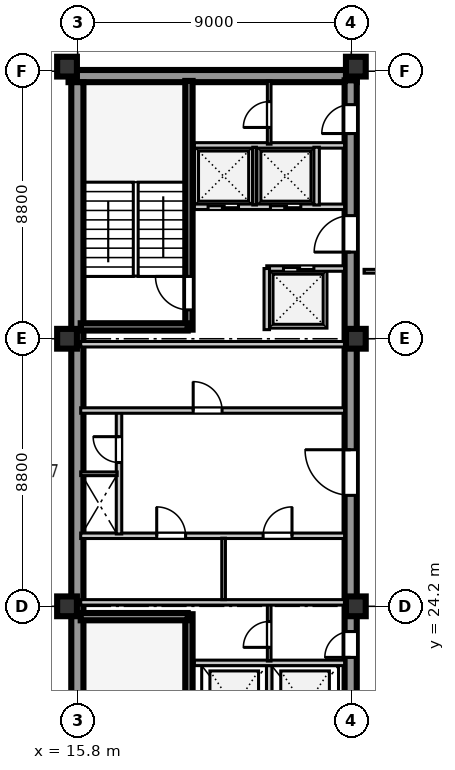
"""IFC4 building model, lengths in metres.
Left out: names, types, materials, properties, quantities, classifications, styles, units other than length and angle.
Written with IfcOpenShell. Run it as: python <this file> out.ifc"""

import sys

from ifc_helpers import new_model, si_unit, direction, frame, frame_2d, origin, origin_2d, place, context, subcontext, project, spatial, rectangle, extrude, element, fill, save


model = new_model("IFC4")
c1 = context("Model", 3, precision=1e-05, world=origin(), true_north=direction((0.0, 1.0)))
c2 = subcontext(c1, "Body", "Model", "MODEL_VIEW")
j1 = project(units=[si_unit("LENGTHUNIT", "METRE"), si_unit("PLANEANGLEUNIT", "RADIAN")], contexts=[c1])
p1 = place(None, origin())
s1 = spatial("IfcSite", under=j1, at=p1, CompositionType="ELEMENT")
p2 = place(p1, origin())
s2 = spatial("IfcBuilding", under=s1, at=p2, CompositionType="ELEMENT")
p3 = place(p2, frame((0.0, 0.0, 272.6)))
s3 = spatial("IfcBuildingStorey", under=s2, at=p3, CompositionType="ELEMENT", Elevation=272.6)
p4 = place(p3, frame((15.5, 41.64, 0.0), z_axis=(0.0, 0.0, 1.0), x_axis=(1.0, 0.0, 0.0)))
e1 = element("IfcWall", 1, at=p4, inside=s3, PredefinedType="SHEAR", context=c2, shape_type="SweptSolid", body=[
    extrude(rectangle(XDim=9.48, YDim=0.4, at=frame_2d((4.74, 0.0))), origin(), (0.0, 0.0, 1.0), 3.66),
])
p5 = place(p3, frame((15.79, 15.81, 0.0), z_axis=(0.0, 0.0, 1.0), x_axis=(0.0, 1.0, 0.0)))
e2 = element("IfcWall", 2, at=p5, inside=s3, PredefinedType="SHEAR", context=c2, shape_type="SweptSolid", body=[
    extrude(rectangle(XDim=25.63, YDim=0.4, at=frame_2d((12.815, 0.0))), origin(), (0.0, 0.0, 1.0), 3.66),
])
p6 = place(p3, frame((24.78, 15.74, 0.0), z_axis=(0.0, 0.0, 1.0), x_axis=(0.0, 1.0, 0.0)))
e3 = element("IfcWall", 3, at=p6, inside=s3, PredefinedType="SHEAR", context=c2, shape_type="SweptSolid", body=[
    extrude(rectangle(XDim=25.76, YDim=0.4, at=frame_2d((12.88, 0.0))), origin(), (0.0, 0.0, 1.0), 3.66),
])
p7 = place(p6, frame((1.61, 0.0, 0.0)))
e4 = element("IfcOpeningElement", 4, at=p7, cuts=e3, PredefinedType="OPENING", context=c2, shape_type="SweptSolid", body=[
    extrude(rectangle(XDim=1.2, YDim=2.1, at=frame_2d((0.6, 1.05))), frame((0.0, 0.21, 0.0), z_axis=(0.0, -1.0, 0.0), x_axis=(1.0, 0.0, 0.0)), (0.0, 0.0, 1.0), 0.42),
])
p8 = place(p6, frame((6.78, 0.0, 0.0)))
e5 = element("IfcOpeningElement", 5, at=p8, cuts=e3, PredefinedType="OPENING", context=c2, shape_type="SweptSolid", body=[
    extrude(rectangle(XDim=0.85, YDim=2.06, at=frame_2d((0.425, 1.03))), frame((0.0, 0.21, 0.0), z_axis=(0.0, -1.0, 0.0), x_axis=(1.0, 0.0, 0.0)), (0.0, 0.0, 1.0), 0.42),
])
p9 = place(p6, frame((12.11, 0.0, 0.0)))
e6 = element("IfcOpeningElement", 6, at=p9, cuts=e3, PredefinedType="OPENING", context=c2, shape_type="SweptSolid", body=[
    extrude(rectangle(XDim=1.5, YDim=2.12, at=frame_2d((0.75, 1.06))), frame((0.0, 0.21, 0.0), z_axis=(0.0, -1.0, 0.0), x_axis=(1.0, 0.0, 0.0)), (0.0, 0.0, 1.0), 0.42),
])
p10 = place(p6, frame((20.11, 0.0, 0.0)))
e7 = element("IfcOpeningElement", 7, at=p10, cuts=e3, PredefinedType="OPENING", context=c2, shape_type="SweptSolid", body=[
    extrude(rectangle(XDim=1.2, YDim=2.12, at=frame_2d((0.6, 1.06))), frame((0.0, 0.21, 0.0), z_axis=(0.0, -1.0, 0.0), x_axis=(1.0, 0.0, 0.0)), (0.0, 0.0, 1.0), 0.42),
])
p11 = place(p6, frame((24.01, 0.0, 0.0)))
e8 = element("IfcOpeningElement", 8, at=p11, cuts=e3, PredefinedType="OPENING", context=c2, shape_type="SweptSolid", body=[
    extrude(rectangle(XDim=0.95, YDim=2.1, at=frame_2d((0.475, 1.05))), frame((0.0, 0.21, 0.0), z_axis=(0.0, -1.0, 0.0), x_axis=(1.0, 0.0, 0.0)), (0.0, 0.0, 1.0), 0.42),
])
for number, where, z_axis, x_axis in (
    (9, (15.45, 24.2, 0.0), (0.0, 0.0, 1.0), (1.0, 0.0, 0.0)),
    (10, (15.45, 33.0, 0.0), (0.0, 0.0, 1.0), (1.0, 0.0, 0.0)),
    (11, (15.45, 41.95, 0.0), (0.0, 0.0, 1.0), (1.0, 0.0, 0.0)),
    (12, (24.95, 24.2, 0.0), (0.0, 0.0, 1.0), (1.0, 0.0, 0.0)),
    (13, (24.95, 33.0, 0.0), (0.0, 0.0, 1.0), (1.0, 0.0, 0.0)),
    (14, (24.95, 41.95, 0.0), (0.0, 0.0, 1.0), (1.0, 0.0, 0.0)),
):
    element("IfcColumn", number, at=place(p3, frame(where, z_axis=z_axis, x_axis=x_axis)), inside=s3, PredefinedType="COLUMN", context=c2, shape_type="SweptSolid", body=[
        extrude(rectangle(XDim=0.65, YDim=0.65, at=origin_2d()), origin(), (0.0, 0.0, 1.0), 3.66),
    ])
p12 = place(p3, frame((19.46, 15.74, 0.0), z_axis=(0.0, 0.0, 1.0), x_axis=(0.0, 1.0, 0.0)))
e15 = element("IfcWall", 15, at=p12, inside=s3, PredefinedType="SHEAR", context=c2, shape_type="SweptSolid", body=[
    extrude(rectangle(XDim=8.2, YDim=0.24, at=frame_2d((4.1, 0.0))), origin(), (0.0, 0.0, 1.0), 3.9),
])
p13 = place(p12, frame((0.45, 0.0, 0.0)))
e16 = element("IfcOpeningElement", 16, at=p13, cuts=e15, PredefinedType="OPENING", context=c2, shape_type="SweptSolid", body=[
    extrude(rectangle(XDim=1.1, YDim=2.1, at=frame_2d((0.55, 1.05))), frame((0.0, 0.13, 0.0), z_axis=(0.0, -1.0, 0.0), x_axis=(1.0, 0.0, 0.0)), (0.0, 0.0, 1.0), 0.26),
])
p14 = place(p3, frame((15.9, 23.86, 0.0), z_axis=(0.0, 0.0, 1.0), x_axis=(1.0, 0.0, 0.0)))
e17 = element("IfcWall", 17, at=p14, inside=s3, PredefinedType="SHEAR", context=c2, shape_type="SweptSolid", body=[
    extrude(rectangle(XDim=3.52, YDim=0.24, at=frame_2d((1.76, 0.0))), origin(), (0.0, 0.0, 1.0), 3.9),
])
p15 = place(p3, frame((22.1, 19.51, 0.0), z_axis=(0.0, 0.0, 1.0), x_axis=(0.0, 1.0, 0.0)))
e18 = element("IfcWall", 18, at=p15, inside=s3, PredefinedType="SOLIDWALL", context=c2, shape_type="SweptSolid", body=[
    extrude(rectangle(XDim=2.74, YDim=0.18, at=frame_2d((1.37, 0.0))), origin(), (0.0, 0.0, 1.0), 3.66),
])
p16 = place(p3, frame((19.64, 22.34, 0.0), z_axis=(0.0, 0.0, 1.0), x_axis=(1.0, 0.0, 0.0)))
e19 = element("IfcWall", 19, at=p16, inside=s3, PredefinedType="SOLIDWALL", context=c2, shape_type="SweptSolid", body=[
    extrude(rectangle(XDim=4.94, YDim=0.18, at=frame_2d((2.47, 0.0))), origin(), (0.0, 0.0, 1.0), 3.66),
])
p17 = place(p3, frame((22.1, 22.4, 0.0), z_axis=(0.0, 0.0, 1.0), x_axis=(0.0, 1.0, 0.0)))
e20 = element("IfcWall", 20, at=p17, inside=s3, PredefinedType="PARTITIONING", context=c2, shape_type="SweptSolid", body=[
    extrude(rectangle(XDim=1.88, YDim=0.12, at=frame_2d((0.94, 0.0))), origin(), (0.0, 0.0, 1.0), 3.66),
])
p18 = place(p17, frame((0.45, 0.0, 0.0)))
e21 = element("IfcOpeningElement", 21, at=p18, cuts=e20, PredefinedType="OPENING", context=c2, shape_type="SweptSolid", body=[
    extrude(rectangle(XDim=0.85, YDim=2.06, at=frame_2d((0.425, 1.03))), frame((0.0, 0.07, 0.0), z_axis=(0.0, -1.0, 0.0), x_axis=(1.0, 0.0, 0.0)), (0.0, 0.0, 1.0), 0.14),
])
p19 = place(p3, frame((15.9, 26.52, 0.0), z_axis=(0.0, 0.0, 1.0), x_axis=(1.0, 0.0, 0.0)))
e22 = element("IfcWall", 22, at=p19, inside=s3, PredefinedType="SOLIDWALL", context=c2, shape_type="SweptSolid", body=[
    extrude(rectangle(XDim=8.68, YDim=0.18, at=frame_2d((4.34, 0.0))), origin(), (0.0, 0.0, 1.0), 3.66),
])
p20 = place(p19, frame((2.5, 0.0, 0.0)))
e23 = element("IfcOpeningElement", 23, at=p20, cuts=e22, PredefinedType="OPENING", context=c2, shape_type="SweptSolid", body=[
    extrude(rectangle(XDim=0.95, YDim=2.1, at=frame_2d((0.475, 1.05))), frame((0.0, 0.1, 0.0), z_axis=(0.0, -1.0, 0.0), x_axis=(1.0, 0.0, 0.0)), (0.0, 0.0, 1.0), 0.2),
])
p21 = place(p19, frame((6.0, 0.0, 0.0)))
e24 = element("IfcOpeningElement", 24, at=p21, cuts=e22, PredefinedType="OPENING", context=c2, shape_type="SweptSolid", body=[
    extrude(rectangle(XDim=0.95, YDim=2.1, at=frame_2d((0.475, 1.05))), frame((0.0, 0.1, 0.0), z_axis=(0.0, -1.0, 0.0), x_axis=(1.0, 0.0, 0.0)), (0.0, 0.0, 1.0), 0.2),
])
p22 = place(p3, frame((15.9, 24.33, 0.0), z_axis=(0.0, 0.0, 1.0), x_axis=(1.0, 0.0, 0.0)))
e25 = element("IfcWall", 25, at=p22, inside=s3, PredefinedType="SOLIDWALL", context=c2, shape_type="SweptSolid", body=[
    extrude(rectangle(XDim=8.68, YDim=0.18, at=frame_2d((4.34, 0.0))), origin(), (0.0, 0.0, 1.0), 3.06),
])
p23 = place(p3, frame((20.6, 24.42, 0.0), z_axis=(0.0, 0.0, 1.0), x_axis=(0.0, 1.0, 0.0)))
e26 = element("IfcWall", 26, at=p23, inside=s3, PredefinedType="PARTITIONING", context=c2, shape_type="SweptSolid", body=[
    extrude(rectangle(XDim=2.02, YDim=0.12, at=frame_2d((1.01, 0.0))), origin(), (0.0, 0.0, 1.0), 3.66),
])
p24 = place(p3, frame((17.16, 26.58, 0.0), z_axis=(0.0, 0.0, 1.0), x_axis=(0.0, 1.0, 0.0)))
e27 = element("IfcWall", 27, at=p24, inside=s3, PredefinedType="SOLIDWALL", context=c2, shape_type="SweptSolid", body=[
    extrude(rectangle(XDim=4.02, YDim=0.18, at=frame_2d((2.01, 0.0))), origin(), (0.0, 0.0, 1.0), 3.66),
])
p25 = place(p24, frame((2.35, 0.0, 0.0)))
e28 = element("IfcOpeningElement", 28, at=p25, cuts=e27, PredefinedType="OPENING", context=c2, shape_type="SweptSolid", body=[
    extrude(rectangle(XDim=0.85, YDim=2.06, at=frame_2d((0.425, 1.03))), frame((0.0, 0.1, 0.0), z_axis=(0.0, -1.0, 0.0), x_axis=(1.0, 0.0, 0.0)), (0.0, 0.0, 1.0), 0.2),
])
p26 = place(p3, frame((15.9, 28.56, 0.0), z_axis=(0.0, 0.0, 1.0), x_axis=(1.0, 0.0, 0.0)))
e29 = element("IfcWall", 29, at=p26, inside=s3, PredefinedType="PARTITIONING", context=c2, shape_type="SweptSolid", body=[
    extrude(rectangle(XDim=1.2, YDim=0.12, at=frame_2d((0.6, 0.0))), origin(), (0.0, 0.0, 1.0), 3.66),
])
p27 = place(p3, frame((15.9, 30.64, 0.0), z_axis=(0.0, 0.0, 1.0), x_axis=(1.0, 0.0, 0.0)))
e30 = element("IfcWall", 30, at=p27, inside=s3, PredefinedType="SOLIDWALL", context=c2, shape_type="SweptSolid", body=[
    extrude(rectangle(XDim=8.68, YDim=0.18, at=frame_2d((4.34, 0.0))), origin(), (0.0, 0.0, 1.0), 3.66),
])
p28 = place(p27, frame((3.7, 0.0, 0.0)))
e31 = element("IfcOpeningElement", 31, at=p28, cuts=e30, PredefinedType="OPENING", context=c2, shape_type="SweptSolid", body=[
    extrude(rectangle(XDim=0.95, YDim=2.1, at=frame_2d((0.475, 1.05))), frame((0.0, 0.1, 0.0), z_axis=(0.0, -1.0, 0.0), x_axis=(1.0, 0.0, 0.0)), (0.0, 0.0, 1.0), 0.2),
])
p29 = place(p3, frame((15.9, 32.82, 0.0), z_axis=(0.0, 0.0, 1.0), x_axis=(1.0, 0.0, 0.0)))
e32 = element("IfcWall", 32, at=p29, inside=s3, PredefinedType="SOLIDWALL", context=c2, shape_type="SweptSolid", body=[
    extrude(rectangle(XDim=8.68, YDim=0.18, at=frame_2d((4.34, 0.0))), origin(), (0.0, 0.0, 1.0), 3.06),
])
p30 = place(p3, frame((19.46, 33.3, 0.0), z_axis=(0.0, 0.0, 1.0), x_axis=(0.0, 1.0, 0.0)))
e33 = element("IfcWall", 33, at=p30, inside=s3, PredefinedType="SHEAR", context=c2, shape_type="SweptSolid", body=[
    extrude(rectangle(XDim=8.18, YDim=0.24, at=frame_2d((4.09, 0.0))), origin(), (0.0, 0.0, 1.0), 3.9),
])
p31 = place(p30, frame((0.65, 0.0, 0.0)))
e34 = element("IfcOpeningElement", 34, at=p31, cuts=e33, PredefinedType="OPENING", context=c2, shape_type="SweptSolid", body=[
    extrude(rectangle(XDim=1.1, YDim=2.1, at=frame_2d((0.55, 1.05))), frame((0.0, 0.13, 0.0), z_axis=(0.0, -1.0, 0.0), x_axis=(1.0, 0.0, 0.0)), (0.0, 0.0, 1.0), 0.26),
])
p32 = place(p3, frame((15.9, 33.39, 0.0), z_axis=(0.0, 0.0, 1.0), x_axis=(1.0, 0.0, 0.0)))
e35 = element("IfcWall", 35, at=p32, inside=s3, PredefinedType="SHEAR", context=c2, shape_type="SweptSolid", body=[
    extrude(rectangle(XDim=3.52, YDim=0.24, at=frame_2d((1.76, 0.0))), origin(), (0.0, 0.0, 1.0), 3.9),
])
p33 = place(p3, frame((22.02, 35.31, 0.0), z_axis=(0.0, 0.0, 1.0), x_axis=(1.0, 0.0, 0.0)))
e36 = element("IfcWall", 36, at=p33, inside=s3, PredefinedType="SOLIDWALL", context=c2, shape_type="SweptSolid", body=[
    extrude(rectangle(XDim=2.56, YDim=0.18, at=frame_2d((1.28, 0.0))), origin(), (0.0, 0.0, 1.0), 3.66),
])
p34 = place(p33, frame((0.55, 0.0, 0.0)))
e37 = element("IfcOpeningElement", 37, at=p34, cuts=e36, PredefinedType="OPENING", context=c2, shape_type="SweptSolid", body=[
    extrude(rectangle(XDim=1.0, YDim=2.1, at=frame_2d((0.5, 1.05))), frame((0.0, 0.1, 0.0), z_axis=(0.0, -1.0, 0.0), x_axis=(1.0, 0.0, 0.0)), (0.0, 0.0, 1.0), 0.2),
])
p35 = place(p3, frame((22.02, 33.3, 0.0), z_axis=(0.0, 0.0, 1.0), x_axis=(0.0, 1.0, 0.0)))
e38 = element("IfcWall", 38, at=p35, inside=s3, PredefinedType="SOLIDWALL", context=c2, shape_type="SweptSolid", body=[
    extrude(rectangle(XDim=2.01, YDim=0.18, at=frame_2d((1.005, 0.0))), origin(), (0.0, 0.0, 1.0), 3.66),
])
p36 = place(p3, frame((19.64, 37.34, 0.0), z_axis=(0.0, 0.0, 1.0), x_axis=(1.0, 0.0, 0.0)))
e39 = element("IfcWall", 39, at=p36, inside=s3, PredefinedType="SOLIDWALL", context=c2, shape_type="SweptSolid", body=[
    extrude(rectangle(XDim=4.94, YDim=0.18, at=frame_2d((2.47, 0.0))), origin(), (0.0, 0.0, 1.0), 3.66),
])
p37 = place(p36, frame((0.45, 0.0, 0.0)))
e40 = element("IfcOpeningElement", 40, at=p37, cuts=e39, PredefinedType="OPENING", context=c2, shape_type="SweptSolid", body=[
    extrude(rectangle(XDim=1.0, YDim=2.1, at=frame_2d((0.5, 1.05))), frame((0.0, 0.1, 0.0), z_axis=(0.0, -1.0, 0.0), x_axis=(1.0, 0.0, 0.0)), (0.0, 0.0, 1.0), 0.2),
])
p38 = place(p36, frame((2.5, 0.0, 0.0)))
e41 = element("IfcOpeningElement", 41, at=p38, cuts=e39, PredefinedType="OPENING", context=c2, shape_type="SweptSolid", body=[
    extrude(rectangle(XDim=1.0, YDim=2.1, at=frame_2d((0.5, 1.05))), frame((0.0, 0.1, 0.0), z_axis=(0.0, -1.0, 0.0), x_axis=(1.0, 0.0, 0.0)), (0.0, 0.0, 1.0), 0.2),
])
p39 = place(p3, frame((19.64, 39.36, 0.0), z_axis=(0.0, 0.0, 1.0), x_axis=(1.0, 0.0, 0.0)))
e42 = element("IfcWall", 42, at=p39, inside=s3, PredefinedType="SOLIDWALL", context=c2, shape_type="SweptSolid", body=[
    extrude(rectangle(XDim=4.94, YDim=0.18, at=frame_2d((2.47, 0.0))), origin(), (0.0, 0.0, 1.0), 3.66),
])
p40 = place(p3, frame((21.62, 37.4, 0.0), z_axis=(0.0, 0.0, 1.0), x_axis=(0.0, 1.0, 0.0)))
e43 = element("IfcWall", 43, at=p40, inside=s3, PredefinedType="PARTITIONING", context=c2, shape_type="SweptSolid", body=[
    extrude(rectangle(XDim=1.9, YDim=0.12, at=frame_2d((0.95, 0.0))), origin(), (0.0, 0.0, 1.0), 3.66),
])
p41 = place(p3, frame((23.66, 37.4, 0.0), z_axis=(0.0, 0.0, 1.0), x_axis=(0.0, 1.0, 0.0)))
e44 = element("IfcWall", 44, at=p41, inside=s3, PredefinedType="SOLIDWALL", context=c2, shape_type="SweptSolid", body=[
    extrude(rectangle(XDim=1.9, YDim=0.18, at=frame_2d((0.95, 0.0))), origin(), (0.0, 0.0, 1.0), 3.66),
])
p42 = place(p3, frame((22.1, 39.4, 0.0), z_axis=(0.0, 0.0, 1.0), x_axis=(0.0, 1.0, 0.0)))
e45 = element("IfcWall", 45, at=p42, inside=s3, PredefinedType="PARTITIONING", context=c2, shape_type="SweptSolid", body=[
    extrude(rectangle(XDim=2.08, YDim=0.12, at=frame_2d((1.04, 0.0))), origin(), (0.0, 0.0, 1.0), 3.66),
])
p43 = place(p42, frame((0.55, 0.0, 0.0)))
e46 = element("IfcOpeningElement", 46, at=p43, cuts=e45, PredefinedType="OPENING", context=c2, shape_type="SweptSolid", body=[
    extrude(rectangle(XDim=0.85, YDim=2.06, at=frame_2d((0.425, 1.03))), frame((0.0, 0.07, 0.0), z_axis=(0.0, -1.0, 0.0), x_axis=(1.0, 0.0, 0.0)), (0.0, 0.0, 1.0), 0.14),
])
p44 = place(p3, frame((25.22, 35.22, 0.0), z_axis=(0.0, 0.0, 1.0), x_axis=(1.0, 0.0, 0.0)))
e47 = element("IfcWall", 47, at=p44, inside=s3, PredefinedType="PLUMBINGWALL", context=c2, shape_type="SweptSolid", body=[
    extrude(rectangle(XDim=9.5, YDim=0.125, at=frame_2d((4.75, 0.0))), origin(), (0.0, 0.0, 1.0), 3.66),
])
p45 = place(p44, frame((1.8, 0.0, 0.0)))
e48 = element("IfcOpeningElement", 48, at=p45, cuts=e47, PredefinedType="OPENING", context=c2, shape_type="SweptSolid", body=[
    extrude(rectangle(XDim=1.1, YDim=2.08, at=frame_2d((0.55, 1.04))), frame((0.0, 0.073, 0.0), z_axis=(0.0, -1.0, 0.0), x_axis=(1.0, 0.0, 0.0)), (0.0, 0.0, 1.0), 0.145),
])
p46 = place(p18, origin())
e49 = element("IfcDoor", 49, at=p46, inside=s3, OperationType="SINGLE_SWING_LEFT", PredefinedType="DOOR", context=c2, shape_type="SweptSolid", body=[
    extrude(rectangle(XDim=0.85, YDim=2.06, at=frame_2d((0.425, 1.03))), frame((0.0, 0.025, 0.0), z_axis=(0.0, -1.0, 0.0), x_axis=(1.0, 0.0, 0.0)), (0.0, 0.0, 1.0), 0.05),
])
fill(e21, e49)
p47 = place(p8, frame((0.85, 0.0, 0.0), z_axis=(0.0, 0.0, 1.0), x_axis=(-1.0, 0.0, 0.0)))
e50 = element("IfcDoor", 50, at=p47, inside=s3, OperationType="SINGLE_SWING_RIGHT", PredefinedType="DOOR", context=c2, shape_type="SweptSolid", body=[
    extrude(rectangle(XDim=0.85, YDim=2.06, at=frame_2d((0.425, 1.03))), frame((0.0, 0.025, 0.0), z_axis=(0.0, -1.0, 0.0), x_axis=(1.0, 0.0, 0.0)), (0.0, 0.0, 1.0), 0.05),
])
fill(e5, e50)
p48 = place(p20, origin())
e51 = element("IfcDoor", 51, at=p48, inside=s3, OperationType="SINGLE_SWING_LEFT", PredefinedType="DOOR", context=c2, shape_type="SweptSolid", body=[
    extrude(rectangle(XDim=0.95, YDim=2.1, at=frame_2d((0.475, 1.05))), frame((0.0, 0.025, 0.0), z_axis=(0.0, -1.0, 0.0), x_axis=(1.0, 0.0, 0.0)), (0.0, 0.0, 1.0), 0.05),
])
fill(e23, e51)
p49 = place(p21, origin())
e52 = element("IfcDoor", 52, at=p49, inside=s3, OperationType="SINGLE_SWING_RIGHT", PredefinedType="DOOR", context=c2, shape_type="SweptSolid", body=[
    extrude(rectangle(XDim=0.95, YDim=2.1, at=frame_2d((0.475, 1.05))), frame((0.0, 0.025, 0.0), z_axis=(0.0, -1.0, 0.0), x_axis=(1.0, 0.0, 0.0)), (0.0, 0.0, 1.0), 0.05),
])
fill(e24, e52)
p50 = place(p25, origin())
e53 = element("IfcDoor", 53, at=p50, inside=s3, OperationType="SINGLE_SWING_RIGHT", PredefinedType="DOOR", context=c2, shape_type="SweptSolid", body=[
    extrude(rectangle(XDim=0.85, YDim=2.06, at=frame_2d((0.425, 1.03))), frame((0.0, 0.025, 0.0), z_axis=(0.0, -1.0, 0.0), x_axis=(1.0, 0.0, 0.0)), (0.0, 0.0, 1.0), 0.05),
])
fill(e28, e53)
p51 = place(p9, frame((1.5, 0.0, 0.0), z_axis=(0.0, 0.0, 1.0), x_axis=(-1.0, 0.0, 0.0)))
e54 = element("IfcDoor", 54, at=p51, inside=s3, OperationType="SINGLE_SWING_LEFT", PredefinedType="DOOR", context=c2, shape_type="SweptSolid", body=[
    extrude(rectangle(XDim=1.5, YDim=2.12, at=frame_2d((0.75, 1.06))), frame((0.0, 0.025, 0.0), z_axis=(0.0, -1.0, 0.0), x_axis=(1.0, 0.0, 0.0)), (0.0, 0.0, 1.0), 0.05),
])
fill(e6, e54)
p52 = place(p28, frame((0.95, 0.0, 0.0), z_axis=(0.0, 0.0, 1.0), x_axis=(-1.0, 0.0, 0.0)))
e55 = element("IfcDoor", 55, at=p52, inside=s3, OperationType="SINGLE_SWING_RIGHT", PredefinedType="DOOR", context=c2, shape_type="SweptSolid", body=[
    extrude(rectangle(XDim=0.95, YDim=2.1, at=frame_2d((0.475, 1.05))), frame((0.0, 0.025, 0.0), z_axis=(0.0, -1.0, 0.0), x_axis=(1.0, 0.0, 0.0)), (0.0, 0.0, 1.0), 0.05),
])
fill(e31, e55)
p53 = place(p31, origin())
e56 = element("IfcDoor", 56, at=p53, inside=s3, OperationType="SINGLE_SWING_RIGHT", PredefinedType="DOOR", context=c2, shape_type="SweptSolid", body=[
    extrude(rectangle(XDim=1.1, YDim=2.1, at=frame_2d((0.55, 1.05))), frame((0.0, 0.025, 0.0), z_axis=(0.0, -1.0, 0.0), x_axis=(1.0, 0.0, 0.0)), (0.0, 0.0, 1.0), 0.05),
])
fill(e34, e56)
p54 = place(p10, frame((1.2, 0.0, 0.0), z_axis=(0.0, 0.0, 1.0), x_axis=(-1.0, 0.0, 0.0)))
e57 = element("IfcDoor", 57, at=p54, inside=s3, OperationType="SINGLE_SWING_RIGHT", PredefinedType="DOOR", context=c2, shape_type="SweptSolid", body=[
    extrude(rectangle(XDim=1.2, YDim=2.12, at=frame_2d((0.6, 1.06))), frame((0.0, 0.025, 0.0), z_axis=(0.0, -1.0, 0.0), x_axis=(1.0, 0.0, 0.0)), (0.0, 0.0, 1.0), 0.05),
])
fill(e7, e57)
p55 = place(p37, frame((1.0, 0.0, 0.0), z_axis=(0.0, 0.0, 1.0), x_axis=(-1.0, 0.0, 0.0)))
e58 = element("IfcDoor", 58, at=p55, inside=s3, OperationType="DOUBLE_DOOR_SLIDING", PredefinedType="DOOR", context=c2, shape_type="SweptSolid", body=[
    extrude(rectangle(XDim=1.0, YDim=2.1, at=frame_2d((0.5, 1.05))), frame((0.0, 0.025, 0.0), z_axis=(0.0, -1.0, 0.0), x_axis=(1.0, 0.0, 0.0)), (0.0, 0.0, 1.0), 0.05),
])
fill(e40, e58)
p56 = place(p38, frame((1.0, 0.0, 0.0), z_axis=(0.0, 0.0, 1.0), x_axis=(-1.0, 0.0, 0.0)))
e59 = element("IfcDoor", 59, at=p56, inside=s3, OperationType="DOUBLE_DOOR_SLIDING", PredefinedType="DOOR", context=c2, shape_type="SweptSolid", body=[
    extrude(rectangle(XDim=1.0, YDim=2.1, at=frame_2d((0.5, 1.05))), frame((0.0, 0.025, 0.0), z_axis=(0.0, -1.0, 0.0), x_axis=(1.0, 0.0, 0.0)), (0.0, 0.0, 1.0), 0.05),
])
fill(e41, e59)
p57 = place(p34, origin())
e60 = element("IfcDoor", 60, at=p57, inside=s3, OperationType="DOUBLE_DOOR_SLIDING", PredefinedType="DOOR", context=c2, shape_type="SweptSolid", body=[
    extrude(rectangle(XDim=1.0, YDim=2.1, at=frame_2d((0.5, 1.05))), frame((0.0, 0.025, 0.0), z_axis=(0.0, -1.0, 0.0), x_axis=(1.0, 0.0, 0.0)), (0.0, 0.0, 1.0), 0.05),
])
fill(e37, e60)
p58 = place(p43, origin())
e61 = element("IfcDoor", 61, at=p58, inside=s3, OperationType="SINGLE_SWING_LEFT", PredefinedType="DOOR", context=c2, shape_type="SweptSolid", body=[
    extrude(rectangle(XDim=0.85, YDim=2.06, at=frame_2d((0.425, 1.03))), frame((0.0, 0.025, 0.0), z_axis=(0.0, -1.0, 0.0), x_axis=(1.0, 0.0, 0.0)), (0.0, 0.0, 1.0), 0.05),
])
fill(e46, e61)
p59 = place(p11, frame((0.95, 0.0, 0.0), z_axis=(0.0, 0.0, 1.0), x_axis=(-1.0, 0.0, 0.0)))
e62 = element("IfcDoor", 62, at=p59, inside=s3, OperationType="SINGLE_SWING_RIGHT", PredefinedType="DOOR", context=c2, shape_type="SweptSolid", body=[
    extrude(rectangle(XDim=0.95, YDim=2.1, at=frame_2d((0.475, 1.05))), frame((0.0, 0.025, 0.0), z_axis=(0.0, -1.0, 0.0), x_axis=(1.0, 0.0, 0.0)), (0.0, 0.0, 1.0), 0.05),
])
fill(e8, e62)
save(model, sys.argv[1])
